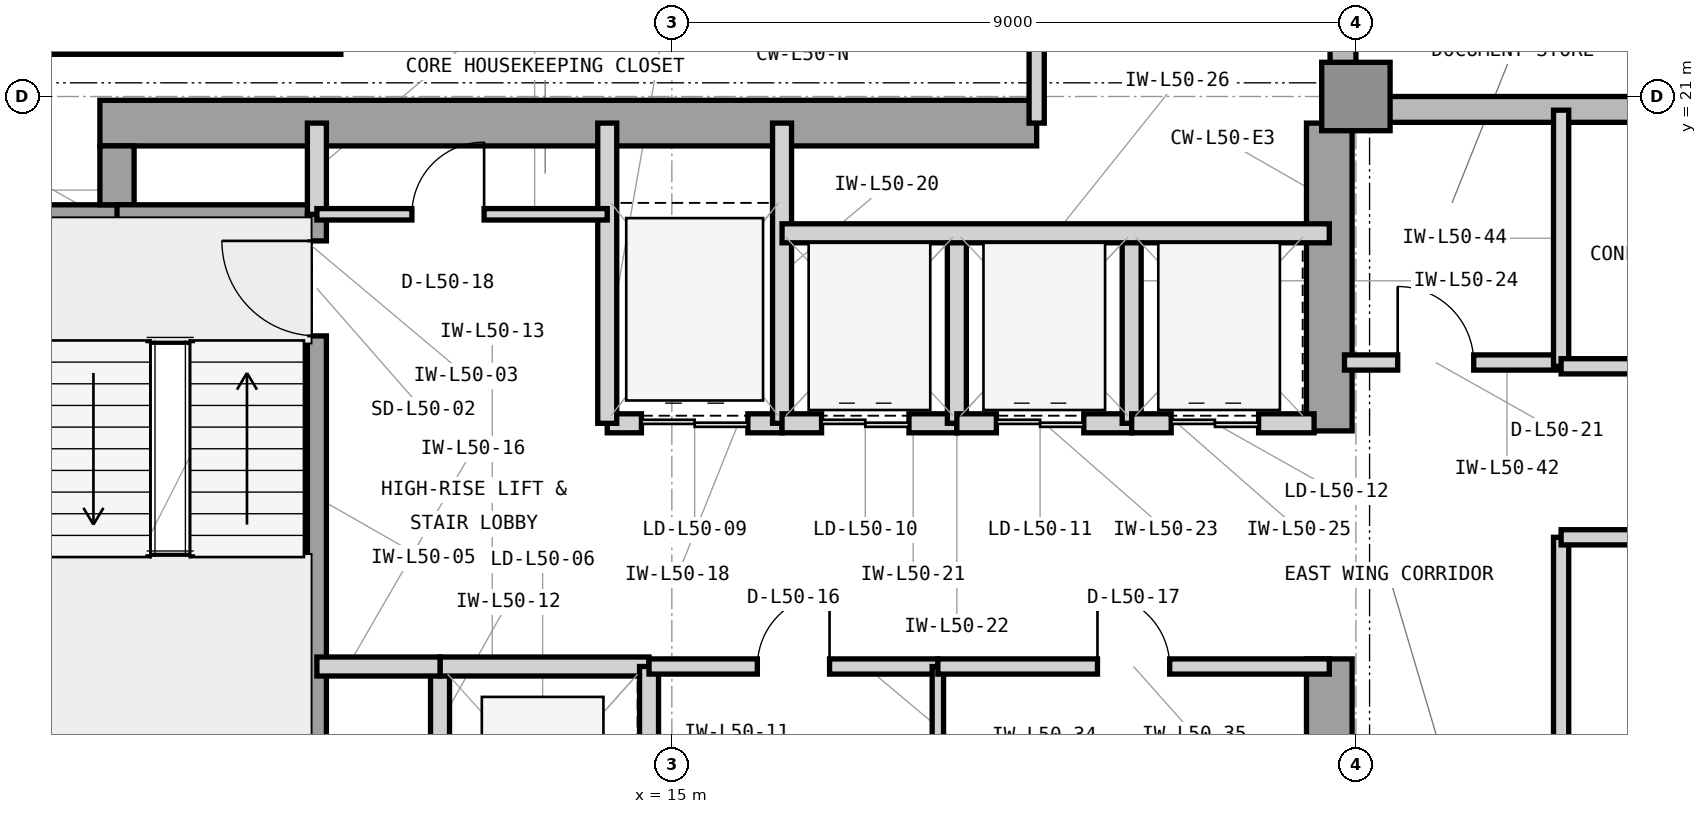
"""IFC4 building model, lengths in metres.
Left out: names, types, materials, properties, quantities, classifications, styles, units other than length and angle.
Written with IfcOpenShell. Run it as: python <this file> out.ifc"""

import sys

from ifc_helpers import new_model, si_unit, direction, frame, frame_2d, origin, origin_2d, place, context, subcontext, project, spatial, rectangle, extrude, element, fill, save


model = new_model("IFC4")
c1 = context("Model", 3, precision=1e-05, world=origin(), true_north=direction((0.0, 1.0)))
c2 = subcontext(c1, "Body", "Model", "MODEL_VIEW")
j1 = project(units=[si_unit("LENGTHUNIT", "METRE"), si_unit("PLANEANGLEUNIT", "RADIAN")], contexts=[c1])
p1 = place(None, origin())
s1 = spatial("IfcSite", under=j1, at=p1, CompositionType="ELEMENT")
p2 = place(p1, origin())
s2 = spatial("IfcBuilding", under=s1, at=p2, CompositionType="ELEMENT")
p3 = place(p2, frame((0.0, 0.0, 207.3)))
s3 = spatial("IfcBuildingStorey", under=s2, at=p3, CompositionType="ELEMENT", Elevation=207.3)
p4 = place(p3, frame((7.475, 20.65, 0.0), z_axis=(0.0, 0.0, 1.0), x_axis=(1.0, 0.0, 0.0)))
e1 = element("IfcWall", 1, at=p4, inside=s3, PredefinedType="SHEAR", context=c2, shape_type="SweptSolid", body=[
    extrude(rectangle(XDim=12.325, YDim=0.6, at=frame_2d((6.163, 0.0))), origin(), (0.0, 0.0, 1.0), 3.9),
])
p5 = place(p3, frame((23.65, 10.4, 0.0), z_axis=(0.0, 0.0, 1.0), x_axis=(0.0, 1.0, 0.0)))
e2 = element("IfcWall", 2, at=p5, inside=s3, PredefinedType="SHEAR", context=c2, shape_type="SweptSolid", body=[
    extrude(rectangle(XDim=3.2, YDim=0.6, at=frame_2d((1.6, 0.0))), origin(), (0.0, 0.0, 1.0), 3.9),
])
p6 = place(p3, frame((23.65, 16.6, 0.0), z_axis=(0.0, 0.0, 1.0), x_axis=(0.0, 1.0, 0.0)))
e3 = element("IfcWall", 3, at=p6, inside=s3, PredefinedType="SHEAR", context=c2, shape_type="SweptSolid", body=[
    extrude(rectangle(XDim=4.05, YDim=0.6, at=frame_2d((2.025, 0.0))), origin(), (0.0, 0.0, 1.0), 3.9),
])
p7 = place(p3, frame((6.65, 19.35, 0.0), z_axis=(0.0, 0.0, 1.0), x_axis=(1.0, 0.0, 0.0)))
e4 = element("IfcWall", 4, at=p7, inside=s3, PredefinedType="SHEAR", context=c2, shape_type="SweptSolid", body=[
    extrude(rectangle(XDim=1.275, YDim=0.45, at=frame_2d((0.638, 0.0))), origin(), (0.0, 0.0, 1.0), 3.9),
])
p8 = place(p3, frame((7.7, 19.575, 0.0), z_axis=(0.0, 0.0, 1.0), x_axis=(0.0, 1.0, 0.0)))
e5 = element("IfcWall", 5, at=p8, inside=s3, PredefinedType="SHEAR", context=c2, shape_type="SweptSolid", body=[
    extrude(rectangle(XDim=0.775, YDim=0.45, at=frame_2d((0.388, 0.0))), origin(), (0.0, 0.0, 1.0), 3.9),
])
p9 = place(p3, frame((24.0, 21.0, 0.0), z_axis=(0.0, 0.0, 1.0), x_axis=(1.0, 0.0, 0.0)))
e6 = element("IfcColumn", 6, at=p9, inside=s3, PredefinedType="COLUMN", context=c2, shape_type="SweptSolid", body=[
    extrude(rectangle(XDim=0.9, YDim=0.9, at=origin_2d()), origin(), (0.0, 0.0, 1.0), 3.9),
])
p10 = place(p3, frame((55.4, 20.83, 0.0), z_axis=(0.0, 0.0, 1.0), x_axis=(-1.0, 0.0, 0.0)))
e7 = element("IfcWall", 7, at=p10, inside=s3, PredefinedType="STANDARD", context=c2, shape_type="SweptSolid", body=[
    extrude(rectangle(XDim=31.4, YDim=0.34, at=frame_2d((15.7, 0.0))), origin(), (0.0, 0.0, 1.0), 3.7),
])
p11 = place(p10, frame((17.167, 0.0, 0.9)))
e8 = element("IfcOpeningElement", 8, at=p11, cuts=e7, PredefinedType="OPENING", context=c2, shape_type="SweptSolid", body=[
    extrude(rectangle(XDim=2.3, YDim=2.2, at=frame_2d((1.15, 1.1))), frame((0.0, 0.18, 0.0), z_axis=(0.0, -1.0, 0.0), x_axis=(1.0, 0.0, 0.0)), (0.0, 0.0, 1.0), 0.36),
])
p12 = place(p10, frame((23.825, 0.0, 0.9)))
e9 = element("IfcOpeningElement", 9, at=p12, cuts=e7, PredefinedType="OPENING", context=c2, shape_type="SweptSolid", body=[
    extrude(rectangle(XDim=2.3, YDim=2.2, at=frame_2d((1.15, 1.1))), frame((0.0, 0.18, 0.0), z_axis=(0.0, -1.0, 0.0), x_axis=(1.0, 0.0, 0.0)), (0.0, 0.0, 1.0), 0.36),
])
p13 = place(p10, frame((8.375, 0.0, 0.9)))
e10 = element("IfcOpeningElement", 10, at=p13, cuts=e7, PredefinedType="OPENING", context=c2, shape_type="SweptSolid", body=[
    extrude(rectangle(XDim=2.3, YDim=2.2, at=frame_2d((1.15, 1.1))), frame((0.0, 0.18, 0.0), z_axis=(0.0, -1.0, 0.0), x_axis=(1.0, 0.0, 0.0)), (0.0, 0.0, 1.0), 0.36),
])
p14 = place(p3, frame((23.83, 21.0, 0.0), z_axis=(0.0, 0.0, 1.0), x_axis=(0.0, 1.0, 0.0)))
e11 = element("IfcWall", 11, at=p14, inside=s3, PredefinedType="STANDARD", context=c2, shape_type="SweptSolid", body=[
    extrude(rectangle(XDim=19.4, YDim=0.34, at=frame_2d((9.7, 0.0))), origin(), (0.0, 0.0, 1.0), 3.7),
])
p15 = place(p3, frame((7.7, 19.45, 0.0), z_axis=(0.0, 0.0, 1.0), x_axis=(1.0, 0.0, 0.0)))
e12 = element("IfcWall", 12, at=p15, inside=s3, PredefinedType="SHEAR", context=c2, shape_type="SweptSolid", body=[
    extrude(rectangle(XDim=2.755, YDim=0.25, at=frame_2d((1.377, 0.0))), origin(), (0.0, 0.0, 1.0), 3.9),
])
p16 = place(p3, frame((10.33, 12.0, 0.0), z_axis=(0.0, 0.0, 1.0), x_axis=(0.0, 1.0, 0.0)))
e13 = element("IfcWall", 13, at=p16, inside=s3, PredefinedType="SHEAR", context=c2, shape_type="SweptSolid", body=[
    extrude(rectangle(XDim=7.45, YDim=0.25, at=frame_2d((3.725, 0.0))), origin(), (0.0, 0.0, 1.0), 3.9),
])
p17 = place(p16, frame((5.85, 0.0, 0.0)))
e14 = element("IfcOpeningElement", 14, at=p17, cuts=e13, PredefinedType="OPENING", context=c2, shape_type="SweptSolid", body=[
    extrude(rectangle(XDim=1.25, YDim=2.2, at=frame_2d((0.625, 1.1))), frame((0.0, 0.135, 0.0), z_axis=(0.0, -1.0, 0.0), x_axis=(1.0, 0.0, 0.0)), (0.0, 0.0, 1.0), 0.27),
])
p18 = place(p3, frame((10.33, 19.45, 0.0), z_axis=(0.0, 0.0, 1.0), x_axis=(0.0, 1.0, 0.0)))
e15 = element("IfcWall", 15, at=p18, inside=s3, PredefinedType="PARTITIONING", context=c2, shape_type="SweptSolid", body=[
    extrude(rectangle(XDim=1.2, YDim=0.25, at=frame_2d((0.6, 0.0))), origin(), (0.0, 0.0, 1.0), 3.69),
])
p19 = place(p3, frame((11.95, 10.5, 0.0), z_axis=(0.0, 0.0, 1.0), x_axis=(0.0, 1.0, 0.0)))
e16 = element("IfcWall", 16, at=p19, inside=s3, PredefinedType="PARTITIONING", context=c2, shape_type="SweptSolid", body=[
    extrude(rectangle(XDim=3.0, YDim=0.25, at=frame_2d((1.5, 0.0))), origin(), (0.0, 0.0, 1.0), 3.69),
])
p20 = place(p3, frame((11.95, 13.5, 0.0), z_axis=(0.0, 0.0, 1.0), x_axis=(1.0, 0.0, 0.0)))
e17 = element("IfcWall", 17, at=p20, inside=s3, PredefinedType="PARTITIONING", context=c2, shape_type="SweptSolid", body=[
    extrude(rectangle(XDim=2.75, YDim=0.25, at=frame_2d((1.375, 0.0))), origin(), (0.0, 0.0, 1.0), 3.283),
])
p21 = place(p3, frame((14.7, 10.5, 0.0), z_axis=(0.0, 0.0, 1.0), x_axis=(0.0, 1.0, 0.0)))
e18 = element("IfcWall", 18, at=p21, inside=s3, PredefinedType="PARTITIONING", context=c2, shape_type="SweptSolid", body=[
    extrude(rectangle(XDim=3.0, YDim=0.25, at=frame_2d((1.5, 0.0))), origin(), (0.0, 0.0, 1.0), 3.69),
])
p22 = place(p3, frame((10.33, 13.5, 0.0), z_axis=(0.0, 0.0, 1.0), x_axis=(1.0, 0.0, 0.0)))
e19 = element("IfcWall", 19, at=p22, inside=s3, PredefinedType="PARTITIONING", context=c2, shape_type="SweptSolid", body=[
    extrude(rectangle(XDim=1.62, YDim=0.25, at=frame_2d((0.81, 0.0))), origin(), (0.0, 0.0, 1.0), 3.283),
])
p23 = place(p3, frame((14.15, 16.7, 0.0), z_axis=(0.0, 0.0, 1.0), x_axis=(1.0, 0.0, 0.0)))
e20 = element("IfcWall", 20, at=p23, inside=s3, PredefinedType="PARTITIONING", context=c2, shape_type="SweptSolid", body=[
    extrude(rectangle(XDim=2.3, YDim=0.25, at=frame_2d((1.15, 0.0))), origin(), (0.0, 0.0, 1.0), 3.283),
])
p24 = place(p23, frame((0.45, 0.0, 0.0)))
e21 = element("IfcOpeningElement", 21, at=p24, cuts=e20, PredefinedType="OPENING", context=c2, shape_type="SweptSolid", body=[
    extrude(rectangle(XDim=1.4, YDim=2.35, at=frame_2d((0.7, 1.175))), frame((0.0, 0.135, 0.0), z_axis=(0.0, -1.0, 0.0), x_axis=(1.0, 0.0, 0.0)), (0.0, 0.0, 1.0), 0.27),
])
for number, where, z_axis, x_axis in (
    (22, (14.15, 16.7, 0.0), (0.0, 0.0, 1.0), (0.0, 1.0, 0.0)),
    (23, (16.45, 16.7, 0.0), (0.0, 0.0, 1.0), (0.0, 1.0, 0.0)),
):
    element("IfcWall", number, at=place(p3, frame(where, z_axis=z_axis, x_axis=x_axis)), inside=s3, PredefinedType="PARTITIONING", context=c2, shape_type="SweptSolid", body=[
        extrude(rectangle(XDim=3.95, YDim=0.25, at=frame_2d((1.975, 0.0))), origin(), (0.0, 0.0, 1.0), 3.69),
    ])
p25 = place(p3, frame((16.45, 16.7, 0.0), z_axis=(0.0, 0.0, 1.0), x_axis=(1.0, 0.0, 0.0)))
e24 = element("IfcWall", 24, at=p25, inside=s3, PredefinedType="PARTITIONING", context=c2, shape_type="SweptSolid", body=[
    extrude(rectangle(XDim=2.3, YDim=0.25, at=frame_2d((1.15, 0.0))), origin(), (0.0, 0.0, 1.0), 3.283),
])
p26 = place(p25, frame((0.52, 0.0, 0.0)))
e25 = element("IfcOpeningElement", 25, at=p26, cuts=e24, PredefinedType="OPENING", context=c2, shape_type="SweptSolid", body=[
    extrude(rectangle(XDim=1.15, YDim=2.25, at=frame_2d((0.575, 1.125))), frame((0.0, 0.135, 0.0), z_axis=(0.0, -1.0, 0.0), x_axis=(1.0, 0.0, 0.0)), (0.0, 0.0, 1.0), 0.27),
])
p27 = place(p3, frame((18.75, 16.7, 0.0), z_axis=(0.0, 0.0, 1.0), x_axis=(0.0, 1.0, 0.0)))
e26 = element("IfcWall", 26, at=p27, inside=s3, PredefinedType="PARTITIONING", context=c2, shape_type="SweptSolid", body=[
    extrude(rectangle(XDim=2.5, YDim=0.25, at=frame_2d((1.25, 0.0))), origin(), (0.0, 0.0, 1.0), 3.69),
])
p28 = place(p3, frame((18.75, 16.7, 0.0), z_axis=(0.0, 0.0, 1.0), x_axis=(1.0, 0.0, 0.0)))
e27 = element("IfcWall", 27, at=p28, inside=s3, PredefinedType="PARTITIONING", context=c2, shape_type="SweptSolid", body=[
    extrude(rectangle(XDim=2.3, YDim=0.25, at=frame_2d((1.15, 0.0))), origin(), (0.0, 0.0, 1.0), 3.283),
])
p29 = place(p28, frame((0.52, 0.0, 0.0)))
e28 = element("IfcOpeningElement", 28, at=p29, cuts=e27, PredefinedType="OPENING", context=c2, shape_type="SweptSolid", body=[
    extrude(rectangle(XDim=1.15, YDim=2.25, at=frame_2d((0.575, 1.125))), frame((0.0, 0.135, 0.0), z_axis=(0.0, -1.0, 0.0), x_axis=(1.0, 0.0, 0.0)), (0.0, 0.0, 1.0), 0.27),
])
p30 = place(p3, frame((21.05, 16.7, 0.0), z_axis=(0.0, 0.0, 1.0), x_axis=(0.0, 1.0, 0.0)))
e29 = element("IfcWall", 29, at=p30, inside=s3, PredefinedType="PARTITIONING", context=c2, shape_type="SweptSolid", body=[
    extrude(rectangle(XDim=2.5, YDim=0.25, at=frame_2d((1.25, 0.0))), origin(), (0.0, 0.0, 1.0), 3.69),
])
p31 = place(p3, frame((21.05, 16.7, 0.0), z_axis=(0.0, 0.0, 1.0), x_axis=(1.0, 0.0, 0.0)))
e30 = element("IfcWall", 30, at=p31, inside=s3, PredefinedType="PARTITIONING", context=c2, shape_type="SweptSolid", body=[
    extrude(rectangle(XDim=2.4, YDim=0.25, at=frame_2d((1.2, 0.0))), origin(), (0.0, 0.0, 1.0), 3.283),
])
p32 = place(p31, frame((0.52, 0.0, 0.0)))
e31 = element("IfcOpeningElement", 31, at=p32, cuts=e30, PredefinedType="OPENING", context=c2, shape_type="SweptSolid", body=[
    extrude(rectangle(XDim=1.15, YDim=2.25, at=frame_2d((0.575, 1.125))), frame((0.0, 0.135, 0.0), z_axis=(0.0, -1.0, 0.0), x_axis=(1.0, 0.0, 0.0)), (0.0, 0.0, 1.0), 0.27),
])
p33 = place(p3, frame((16.45, 19.2, 0.0), z_axis=(0.0, 0.0, 1.0), x_axis=(1.0, 0.0, 0.0)))
e32 = element("IfcWall", 32, at=p33, inside=s3, PredefinedType="PARTITIONING", context=c2, shape_type="SweptSolid", body=[
    extrude(rectangle(XDim=7.2, YDim=0.25, at=frame_2d((3.6, 0.0))), origin(), (0.0, 0.0, 1.0), 3.69),
])
p34 = place(p3, frame((14.7, 13.5, 0.0), z_axis=(0.0, 0.0, 1.0), x_axis=(1.0, 0.0, 0.0)))
e33 = element("IfcWall", 33, at=p34, inside=s3, PredefinedType="PARTITIONING", context=c2, shape_type="SweptSolid", body=[
    extrude(rectangle(XDim=3.8, YDim=0.2, at=frame_2d((1.9, 0.0))), origin(), (0.0, 0.0, 1.0), 3.283),
])
p35 = place(p34, frame((1.425, 0.0, 0.0)))
e34 = element("IfcOpeningElement", 34, at=p35, cuts=e33, PredefinedType="OPENING", context=c2, shape_type="SweptSolid", body=[
    extrude(rectangle(XDim=0.95, YDim=2.1, at=frame_2d((0.475, 1.05))), frame((0.0, 0.11, 0.0), z_axis=(0.0, -1.0, 0.0), x_axis=(1.0, 0.0, 0.0)), (0.0, 0.0, 1.0), 0.22),
])
p36 = place(p3, frame((18.5, 10.15, 0.0), z_axis=(0.0, 0.0, 1.0), x_axis=(0.0, 1.0, 0.0)))
e35 = element("IfcWall", 35, at=p36, inside=s3, PredefinedType="PARTITIONING", context=c2, shape_type="SweptSolid", body=[
    extrude(rectangle(XDim=3.35, YDim=0.15, at=frame_2d((1.675, 0.0))), origin(), (0.0, 0.0, 1.0), 3.69),
])
p37 = place(p3, frame((18.5, 13.5, 0.0), z_axis=(0.0, 0.0, 1.0), x_axis=(1.0, 0.0, 0.0)))
e36 = element("IfcWall", 36, at=p37, inside=s3, PredefinedType="PARTITIONING", context=c2, shape_type="SweptSolid", body=[
    extrude(rectangle(XDim=5.15, YDim=0.2, at=frame_2d((2.575, 0.0))), origin(), (0.0, 0.0, 1.0), 3.283),
])
p38 = place(p37, frame((2.1, 0.0, 0.0)))
e37 = element("IfcOpeningElement", 37, at=p38, cuts=e36, PredefinedType="OPENING", context=c2, shape_type="SweptSolid", body=[
    extrude(rectangle(XDim=0.95, YDim=2.1, at=frame_2d((0.475, 1.05))), frame((0.0, 0.11, 0.0), z_axis=(0.0, -1.0, 0.0), x_axis=(1.0, 0.0, 0.0)), (0.0, 0.0, 1.0), 0.22),
])
p39 = place(p3, frame((10.33, 19.45, 0.0), z_axis=(0.0, 0.0, 1.0), x_axis=(1.0, 0.0, 0.0)))
e38 = element("IfcWall", 38, at=p39, inside=s3, PredefinedType="PARTITIONING", context=c2, shape_type="SweptSolid", body=[
    extrude(rectangle(XDim=3.82, YDim=0.15, at=frame_2d((1.91, 0.0))), origin(), (0.0, 0.0, 1.0), 3.69),
])
p40 = place(p39, frame((1.25, 0.0, 0.0)))
e39 = element("IfcOpeningElement", 39, at=p40, cuts=e38, PredefinedType="OPENING", context=c2, shape_type="SweptSolid", body=[
    extrude(rectangle(XDim=0.95, YDim=2.1, at=frame_2d((0.475, 1.05))), frame((0.0, 0.085, 0.0), z_axis=(0.0, -1.0, 0.0), x_axis=(1.0, 0.0, 0.0)), (0.0, 0.0, 1.0), 0.17),
])
p41 = place(p3, frame((6.555, 21.68, 0.0), z_axis=(0.0, 0.0, 1.0), x_axis=(1.0, 0.0, 0.0)))
e40 = element("IfcWall", 40, at=p41, inside=s3, PredefinedType="SHEAR", context=c2, shape_type="SweptSolid", body=[
    extrude(rectangle(XDim=4.09, YDim=0.25, at=frame_2d((2.045, 0.0))), origin(), (0.0, 0.0, 1.0), 3.9),
])
p42 = place(p3, frame((23.85, 17.5, 0.0), z_axis=(0.0, 0.0, 1.0), x_axis=(1.0, 0.0, 0.0)))
e41 = element("IfcWall", 41, at=p42, inside=s3, PredefinedType="PARTITIONING", context=c2, shape_type="SweptSolid", body=[
    extrude(rectangle(XDim=2.85, YDim=0.2, at=frame_2d((1.425, 0.0))), origin(), (0.0, 0.0, 1.0), 3.69),
])
p43 = place(p42, frame((0.7, 0.0, 0.0)))
e42 = element("IfcOpeningElement", 42, at=p43, cuts=e41, PredefinedType="OPENING", context=c2, shape_type="SweptSolid", body=[
    extrude(rectangle(XDim=1.0, YDim=2.15, at=frame_2d((0.5, 1.075))), frame((0.0, 0.11, 0.0), z_axis=(0.0, -1.0, 0.0), x_axis=(1.0, 0.0, 0.0)), (0.0, 0.0, 1.0), 0.22),
])
p44 = place(p3, frame((26.7, 3.18, 0.0), z_axis=(0.0, 0.0, 1.0), x_axis=(0.0, 1.0, 0.0)))
e43 = element("IfcWall", 43, at=p44, inside=s3, PredefinedType="PARTITIONING", context=c2, shape_type="SweptSolid", body=[
    extrude(rectangle(XDim=12.02, YDim=0.2, at=frame_2d((6.01, 0.0))), origin(), (0.0, 0.0, 1.0), 3.69),
])
p45 = place(p3, frame((26.7, 17.45, 0.0), z_axis=(0.0, 0.0, 1.0), x_axis=(0.0, 1.0, 0.0)))
e44 = element("IfcWall", 44, at=p45, inside=s3, PredefinedType="PARTITIONING", context=c2, shape_type="SweptSolid", body=[
    extrude(rectangle(XDim=3.37, YDim=0.2, at=frame_2d((1.685, 0.0))), origin(), (0.0, 0.0, 1.0), 3.69),
])
p46 = place(p3, frame((26.7, 15.2, 0.0), z_axis=(0.0, 0.0, 1.0), x_axis=(1.0, 0.0, 0.0)))
e45 = element("IfcWall", 45, at=p46, inside=s3, PredefinedType="PARTITIONING", context=c2, shape_type="SweptSolid", body=[
    extrude(rectangle(XDim=7.0, YDim=0.2, at=frame_2d((3.5, 0.0))), origin(), (0.0, 0.0, 1.0), 3.69),
])
p47 = place(p46, frame((2.5, 0.0, 0.0)))
e46 = element("IfcOpeningElement", 46, at=p47, cuts=e45, PredefinedType="OPENING", context=c2, shape_type="SweptSolid", body=[
    extrude(rectangle(XDim=2.0, YDim=2.5, at=frame_2d((1.0, 1.25))), frame((0.0, 0.11, 0.0), z_axis=(0.0, -1.0, 0.0), x_axis=(1.0, 0.0, 0.0)), (0.0, 0.0, 1.0), 0.22),
])
p48 = place(p3, frame((26.7, 17.45, 0.0), z_axis=(0.0, 0.0, 1.0), x_axis=(1.0, 0.0, 0.0)))
e47 = element("IfcWall", 47, at=p48, inside=s3, PredefinedType="PARTITIONING", context=c2, shape_type="SweptSolid", body=[
    extrude(rectangle(XDim=7.5, YDim=0.2, at=frame_2d((3.75, 0.0))), origin(), (0.0, 0.0, 1.0), 3.69),
])
p49 = place(p48, frame((3.0, 0.0, 0.0)))
e48 = element("IfcOpeningElement", 48, at=p49, cuts=e47, PredefinedType="OPENING", context=c2, shape_type="SweptSolid", body=[
    extrude(rectangle(XDim=1.5, YDim=2.3, at=frame_2d((0.75, 1.15))), frame((0.0, 0.11, 0.0), z_axis=(0.0, -1.0, 0.0), x_axis=(1.0, 0.0, 0.0)), (0.0, 0.0, 1.0), 0.22),
])
p50 = place(p3, frame((19.8, 20.65, 0.0), z_axis=(0.0, 0.0, 1.0), x_axis=(0.0, 1.0, 0.0)))
e49 = element("IfcWall", 49, at=p50, inside=s3, PredefinedType="PARTITIONING", context=c2, shape_type="SweptSolid", body=[
    extrude(rectangle(XDim=6.15, YDim=0.2, at=frame_2d((3.075, 0.0))), origin(), (0.0, 0.0, 1.0), 3.69),
])
p51 = place(p17, origin())
e50 = element("IfcDoor", 50, at=p51, inside=s3, OperationType="SINGLE_SWING_RIGHT", PredefinedType="DOOR", context=c2, shape_type="SweptSolid", body=[
    extrude(rectangle(XDim=1.25, YDim=2.2, at=frame_2d((0.625, 1.1))), frame((0.0, 0.025, 0.0), z_axis=(0.0, -1.0, 0.0), x_axis=(1.0, 0.0, 0.0)), (0.0, 0.0, 1.0), 0.05),
])
fill(e14, e50)
p52 = place(p24, origin())
e51 = element("IfcDoor", 51, at=p52, inside=s3, OperationType="DOUBLE_DOOR_SLIDING", PredefinedType="DOOR", context=c2, shape_type="SweptSolid", body=[
    extrude(rectangle(XDim=1.4, YDim=2.35, at=frame_2d((0.7, 1.175))), frame((0.0, 0.025, 0.0), z_axis=(0.0, -1.0, 0.0), x_axis=(1.0, 0.0, 0.0)), (0.0, 0.0, 1.0), 0.05),
])
fill(e21, e51)
p53 = place(p26, origin())
e52 = element("IfcDoor", 52, at=p53, inside=s3, OperationType="DOUBLE_DOOR_SLIDING", PredefinedType="DOOR", context=c2, shape_type="SweptSolid", body=[
    extrude(rectangle(XDim=1.15, YDim=2.25, at=frame_2d((0.575, 1.125))), frame((0.0, 0.025, 0.0), z_axis=(0.0, -1.0, 0.0), x_axis=(1.0, 0.0, 0.0)), (0.0, 0.0, 1.0), 0.05),
])
fill(e25, e52)
p54 = place(p29, origin())
e53 = element("IfcDoor", 53, at=p54, inside=s3, OperationType="DOUBLE_DOOR_SLIDING", PredefinedType="DOOR", context=c2, shape_type="SweptSolid", body=[
    extrude(rectangle(XDim=1.15, YDim=2.25, at=frame_2d((0.575, 1.125))), frame((0.0, 0.025, 0.0), z_axis=(0.0, -1.0, 0.0), x_axis=(1.0, 0.0, 0.0)), (0.0, 0.0, 1.0), 0.05),
])
fill(e28, e53)
p55 = place(p32, origin())
e54 = element("IfcDoor", 54, at=p55, inside=s3, OperationType="DOUBLE_DOOR_SLIDING", PredefinedType="DOOR", context=c2, shape_type="SweptSolid", body=[
    extrude(rectangle(XDim=1.15, YDim=2.25, at=frame_2d((0.575, 1.125))), frame((0.0, 0.025, 0.0), z_axis=(0.0, -1.0, 0.0), x_axis=(1.0, 0.0, 0.0)), (0.0, 0.0, 1.0), 0.05),
])
fill(e31, e54)
p56 = place(p35, origin())
e55 = element("IfcDoor", 55, at=p56, inside=s3, OperationType="SINGLE_SWING_RIGHT", PredefinedType="DOOR", context=c2, shape_type="SweptSolid", body=[
    extrude(rectangle(XDim=0.95, YDim=2.1, at=frame_2d((0.475, 1.05))), frame((0.0, 0.025, 0.0), z_axis=(0.0, -1.0, 0.0), x_axis=(1.0, 0.0, 0.0)), (0.0, 0.0, 1.0), 0.05),
])
fill(e34, e55)
p57 = place(p38, origin())
e56 = element("IfcDoor", 56, at=p57, inside=s3, OperationType="SINGLE_SWING_LEFT", PredefinedType="DOOR", context=c2, shape_type="SweptSolid", body=[
    extrude(rectangle(XDim=0.95, YDim=2.1, at=frame_2d((0.475, 1.05))), frame((0.0, 0.025, 0.0), z_axis=(0.0, -1.0, 0.0), x_axis=(1.0, 0.0, 0.0)), (0.0, 0.0, 1.0), 0.05),
])
fill(e37, e56)
p58 = place(p40, origin())
e57 = element("IfcDoor", 57, at=p58, inside=s3, OperationType="SINGLE_SWING_RIGHT", PredefinedType="DOOR", context=c2, shape_type="SweptSolid", body=[
    extrude(rectangle(XDim=0.95, YDim=2.1, at=frame_2d((0.475, 1.05))), frame((0.0, 0.025, 0.0), z_axis=(0.0, -1.0, 0.0), x_axis=(1.0, 0.0, 0.0)), (0.0, 0.0, 1.0), 0.05),
])
fill(e39, e57)
p59 = place(p43, origin())
e58 = element("IfcDoor", 58, at=p59, inside=s3, OperationType="SINGLE_SWING_LEFT", PredefinedType="DOOR", context=c2, shape_type="SweptSolid", body=[
    extrude(rectangle(XDim=1.0, YDim=2.15, at=frame_2d((0.5, 1.075))), frame((0.0, 0.025, 0.0), z_axis=(0.0, -1.0, 0.0), x_axis=(1.0, 0.0, 0.0)), (0.0, 0.0, 1.0), 0.05),
])
fill(e42, e58)
save(model, sys.argv[1])
